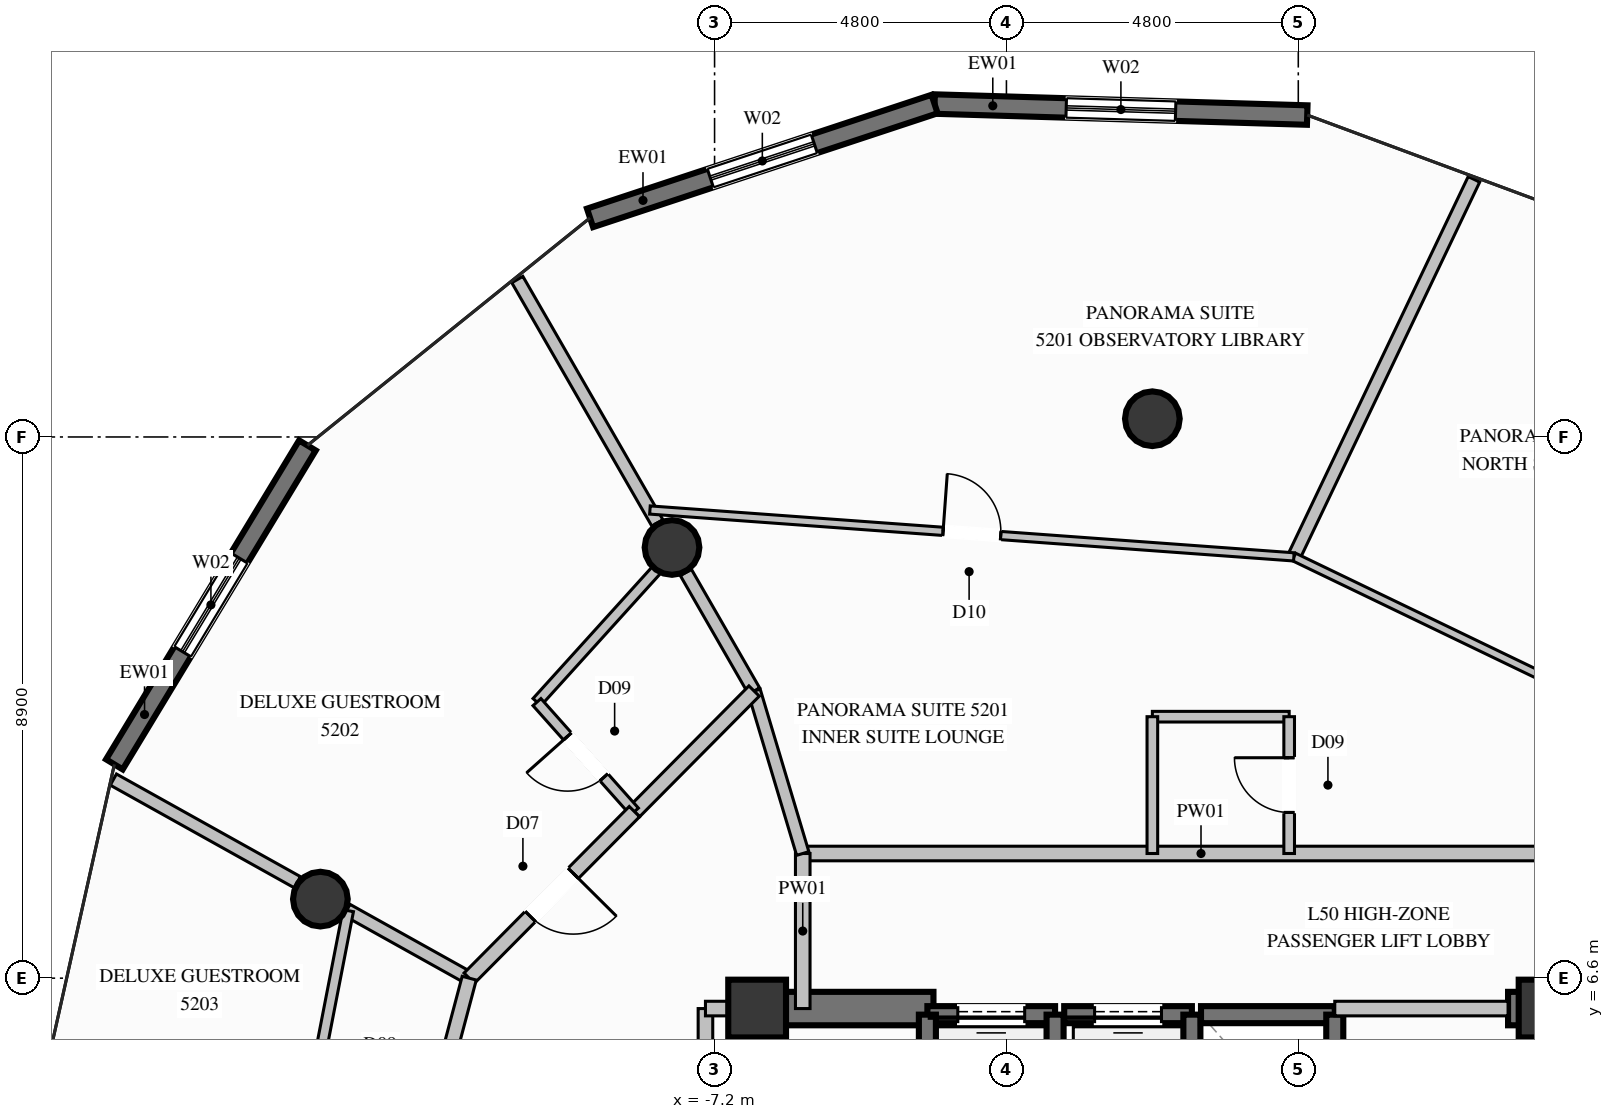
"""IFC4 building model, lengths in metres.
Left out: names, types, materials, properties, quantities, classifications, styles, units other than length and angle.
Written with IfcOpenShell. Run it as: python <this file> out.ifc"""

import sys

from ifc_helpers import new_model, si_unit, direction, frame, frame_2d, origin, origin_2d, place, context, subcontext, project, spatial, rectangle, circle, extrude, element, fill, save


model = new_model("IFC4")
c1 = context("Model", 3, precision=1e-05, world=origin(), true_north=direction((0.0, 1.0)))
c2 = subcontext(c1, "Body", "Model", "MODEL_VIEW")
j1 = project(units=[si_unit("LENGTHUNIT", "METRE"), si_unit("PLANEANGLEUNIT", "RADIAN")], contexts=[c1])
p1 = place(None, origin())
s1 = spatial("IfcSite", under=j1, at=p1, CompositionType="ELEMENT")
p2 = place(p1, origin())
s2 = spatial("IfcBuilding", under=s1, at=p2, CompositionType="ELEMENT")
p3 = place(p2, frame((0.0, 0.0, 194.8)))
s3 = spatial("IfcBuildingStorey", under=s2, at=p3, CompositionType="ELEMENT", Elevation=194.8)
for number, where, z_axis, x_axis in (
    (1, (6.5, 6.1, 0.0), (0.0, 0.0, 1.0), (1.0, 0.0, 0.0)),
    (2, (-6.5, 6.1, 0.0), (0.0, 0.0, 1.0), (1.0, 0.0, 0.0)),
):
    element("IfcColumn", number, at=place(p3, frame(where, z_axis=z_axis, x_axis=x_axis)), inside=s3, PredefinedType="COLUMN", context=c2, shape_type="SweptSolid", body=[
        extrude(rectangle(XDim=0.95, YDim=0.95, at=origin_2d()), origin(), (0.0, 0.0, 1.0), 3.6),
    ])
p4 = place(p3, frame((-6.225, 6.1, 0.0), z_axis=(0.0, 0.0, 1.0), x_axis=(1.0, 0.0, 0.0)))
e3 = element("IfcWall", 3, at=p4, inside=s3, PredefinedType="SHEAR", context=c2, shape_type="SweptSolid", body=[
    extrude(rectangle(XDim=2.625, YDim=0.55, at=frame_2d((1.312, 0.0))), origin(), (0.0, 0.0, 1.0), 3.6),
])
p5 = place(p3, frame((5.85, 6.1, 0.0), z_axis=(0.0, 0.0, 1.0), x_axis=(1.0, 0.0, 0.0)))
e4 = element("IfcWall", 4, at=p5, inside=s3, PredefinedType="SHEAR", context=c2, shape_type="SweptSolid", body=[
    extrude(rectangle(XDim=0.375, YDim=0.55, at=frame_2d((0.188, 0.0))), origin(), (0.0, 0.0, 1.0), 3.6),
])
p6 = place(p3, frame((-6.5, 2.35, 0.0), z_axis=(0.0, 0.0, 1.0), x_axis=(0.0, 1.0, 0.0)))
e5 = element("IfcWall", 5, at=p6, inside=s3, PredefinedType="SHEAR", context=c2, shape_type="SweptSolid", body=[
    extrude(rectangle(XDim=4.025, YDim=0.55, at=frame_2d((2.012, 0.0))), origin(), (0.0, 0.0, 1.0), 3.6),
])
p7 = place(p3, frame((6.5, 3.35, 0.0), z_axis=(0.0, 0.0, 1.0), x_axis=(0.0, 1.0, 0.0)))
e6 = element("IfcWall", 6, at=p7, inside=s3, PredefinedType="SHEAR", context=c2, shape_type="SweptSolid", body=[
    extrude(rectangle(XDim=3.025, YDim=0.55, at=frame_2d((1.512, 0.0))), origin(), (0.0, 0.0, 1.0), 3.6),
])
for number, where, z_axis, x_axis in (
    (7, (0.0, 15.8, 0.0), (0.0, 0.0, 1.0), (1.0, 0.0, 0.0)),
    (8, (-7.9, 13.683, 0.0), (0.0, 0.0, 1.0), (1.0, 0.0, 0.0)),
    (9, (-13.683, 7.9, 0.0), (0.0, 0.0, 1.0), (1.0, 0.0, 0.0)),
):
    element("IfcColumn", number, at=place(p3, frame(where, z_axis=z_axis, x_axis=x_axis)), inside=s3, PredefinedType="COLUMN", context=c2, shape_type="SweptSolid", body=[
        extrude(circle(Radius=0.45, at=origin_2d()), origin(), (0.0, 0.0, 1.0), 3.6),
    ])
p8 = place(p3, frame((-3.582, 20.975, 0.0), z_axis=(0.0, 0.0, 1.0), x_axis=(0.999563511361, -0.029542964566, 0.0)))
e10 = element("IfcWall", 10, at=p8, inside=s3, PredefinedType="SOLIDWALL", context=c2, shape_type="SweptSolid", body=[
    extrude(rectangle(XDim=6.132, YDim=0.32, at=frame_2d((3.066, 0.0))), origin(), (0.0, 0.0, 1.0), 3.36),
])
p9 = place(p8, frame((2.166, 0.0, 0.35)))
e11 = element("IfcOpeningElement", 11, at=p9, cuts=e10, PredefinedType="OPENING", context=c2, shape_type="SweptSolid", body=[
    extrude(rectangle(XDim=1.8, YDim=2.6, at=frame_2d((0.9, 1.3))), frame((0.0, 0.17, 0.0), z_axis=(0.0, -1.0, 0.0), x_axis=(1.0, 0.0, 0.0)), (0.0, 0.0, 1.0), 0.34),
])
p10 = place(p3, frame((-9.248, 19.103, 0.0), z_axis=(0.0, 0.0, 1.0), x_axis=(0.949514623973, 0.313722773898, 0.0)))
e12 = element("IfcWall", 12, at=p10, inside=s3, PredefinedType="SOLIDWALL", context=c2, shape_type="SweptSolid", body=[
    extrude(rectangle(XDim=5.967, YDim=0.32, at=frame_2d((2.984, 0.0))), origin(), (0.0, 0.0, 1.0), 3.36),
])
p11 = place(p10, frame((2.084, 0.0, 0.35)))
e13 = element("IfcOpeningElement", 13, at=p11, cuts=e12, PredefinedType="OPENING", context=c2, shape_type="SweptSolid", body=[
    extrude(rectangle(XDim=1.8, YDim=2.6, at=frame_2d((0.9, 1.3))), frame((0.0, 0.17, 0.0), z_axis=(0.0, -1.0, 0.0), x_axis=(1.0, 0.0, 0.0)), (0.0, 0.0, 1.0), 0.34),
])
p12 = place(p3, frame((-17.071, 10.116, 0.0), z_axis=(0.0, 0.0, 1.0), x_axis=(0.517847159829, 0.855473155077, 0.0)))
e14 = element("IfcWall", 14, at=p12, inside=s3, PredefinedType="SOLIDWALL", context=c2, shape_type="SweptSolid", body=[
    extrude(rectangle(XDim=6.131, YDim=0.32, at=frame_2d((3.066, 0.0))), origin(), (0.0, 0.0, 1.0), 3.36),
])
p13 = place(p12, frame((2.166, 0.0, 0.35)))
e15 = element("IfcOpeningElement", 15, at=p13, cuts=e14, PredefinedType="OPENING", context=c2, shape_type="SweptSolid", body=[
    extrude(rectangle(XDim=1.8, YDim=2.6, at=frame_2d((0.9, 1.3))), frame((0.0, 0.17, 0.0), z_axis=(0.0, -1.0, 0.0), x_axis=(1.0, 0.0, 0.0)), (0.0, 0.0, 1.0), 0.34),
])
p14 = place(p3, frame((-1.6, 6.0, 0.0), z_axis=(0.0, 0.0, 1.0), x_axis=(-1.0, 0.0, 0.0)))
e16 = element("IfcWall", 16, at=p14, inside=s3, PredefinedType="SOLIDWALL", context=c2, shape_type="SweptSolid", body=[
    extrude(rectangle(XDim=2.1, YDim=0.28, at=frame_2d((1.05, 0.0))), origin(), (0.0, 0.0, 1.0), 3.36),
])
p15 = place(p14, frame((0.5, 0.0, 0.0)))
e17 = element("IfcOpeningElement", 17, at=p15, cuts=e16, PredefinedType="OPENING", context=c2, shape_type="SweptSolid", body=[
    extrude(rectangle(XDim=1.1, YDim=2.2, at=frame_2d((0.55, 1.1))), frame((0.0, 0.15, 0.0), z_axis=(0.0, -1.0, 0.0), x_axis=(1.0, 0.0, 0.0)), (0.0, 0.0, 1.0), 0.3),
])
for number, where, z_axis, x_axis in (
    (18, (-3.7, 6.0, 0.0), (0.0, 0.0, 1.0), (0.0, -1.0, 0.0)),
    (19, (-1.6, 3.5, 0.0), (0.0, 0.0, 1.0), (0.0, 1.0, 0.0)),
):
    element("IfcWall", number, at=place(p3, frame(where, z_axis=z_axis, x_axis=x_axis)), inside=s3, PredefinedType="SOLIDWALL", context=c2, shape_type="SweptSolid", body=[
        extrude(rectangle(XDim=2.5, YDim=0.28, at=frame_2d((1.25, 0.0))), origin(), (0.0, 0.0, 1.0), 3.36),
    ])
p16 = place(p3, frame((0.65, 6.0, 0.0), z_axis=(0.0, 0.0, 1.0), x_axis=(-1.0, 0.0, 0.0)))
e20 = element("IfcWall", 20, at=p16, inside=s3, PredefinedType="SOLIDWALL", context=c2, shape_type="SweptSolid", body=[
    extrude(rectangle(XDim=2.1, YDim=0.28, at=frame_2d((1.05, 0.0))), origin(), (0.0, 0.0, 1.0), 3.36),
])
p17 = place(p16, frame((0.5, 0.0, 0.0)))
e21 = element("IfcOpeningElement", 21, at=p17, cuts=e20, PredefinedType="OPENING", context=c2, shape_type="SweptSolid", body=[
    extrude(rectangle(XDim=1.1, YDim=2.2, at=frame_2d((0.55, 1.1))), frame((0.0, 0.15, 0.0), z_axis=(0.0, -1.0, 0.0), x_axis=(1.0, 0.0, 0.0)), (0.0, 0.0, 1.0), 0.3),
])
p18 = place(p3, frame((0.65, 3.5, 0.0), z_axis=(0.0, 0.0, 1.0), x_axis=(0.0, 1.0, 0.0)))
e22 = element("IfcWall", 22, at=p18, inside=s3, PredefinedType="SOLIDWALL", context=c2, shape_type="SweptSolid", body=[
    extrude(rectangle(XDim=2.5, YDim=0.28, at=frame_2d((1.25, 0.0))), origin(), (0.0, 0.0, 1.0), 3.36),
])
p19 = place(p3, frame((3.0, 6.0, 0.0), z_axis=(0.0, 0.0, 1.0), x_axis=(-1.0, 0.0, 0.0)))
e23 = element("IfcWall", 23, at=p19, inside=s3, PredefinedType="SOLIDWALL", context=c2, shape_type="SweptSolid", body=[
    extrude(rectangle(XDim=2.2, YDim=0.28, at=frame_2d((1.1, 0.0))), origin(), (0.0, 0.0, 1.0), 3.36),
])
p20 = place(p3, frame((3.0, 3.5, 0.0), z_axis=(0.0, 0.0, 1.0), x_axis=(0.0, 1.0, 0.0)))
e24 = element("IfcWall", 24, at=p20, inside=s3, PredefinedType="SOLIDWALL", context=c2, shape_type="SweptSolid", body=[
    extrude(rectangle(XDim=2.5, YDim=0.28, at=frame_2d((1.25, 0.0))), origin(), (0.0, 0.0, 1.0), 3.36),
])
p21 = place(p3, frame((-5.75, 8.65, 0.0), z_axis=(0.0, 0.0, 1.0), x_axis=(1.0, 0.0, 0.0)))
e25 = element("IfcWall", 25, at=p21, inside=s3, PredefinedType="PARTITIONING", context=c2, shape_type="SweptSolid", body=[
    extrude(rectangle(XDim=13.1, YDim=0.24, at=frame_2d((6.55, 0.0))), origin(), (0.0, 0.0, 1.0), 3.36),
])
p22 = place(p3, frame((3.0, 6.1, 0.0), z_axis=(0.0, 0.0, 1.0), x_axis=(1.0, 0.0, 0.0)))
e26 = element("IfcWall", 26, at=p22, inside=s3, PredefinedType="PARTITIONING", context=c2, shape_type="SweptSolid", body=[
    extrude(rectangle(XDim=2.85, YDim=0.24, at=frame_2d((1.425, 0.0))), origin(), (0.0, 0.0, 1.0), 2.445),
])
p23 = place(p3, frame((-5.75, 6.1, 0.0), z_axis=(0.0, 0.0, 1.0), x_axis=(0.0, 1.0, 0.0)))
e27 = element("IfcWall", 27, at=p23, inside=s3, PredefinedType="PARTITIONING", context=c2, shape_type="SweptSolid", body=[
    extrude(rectangle(XDim=2.55, YDim=0.24, at=frame_2d((1.275, 0.0))), origin(), (0.0, 0.0, 1.0), 3.36),
])
p24 = place(p3, frame((-7.35, 4.95, 0.0), z_axis=(0.0, 0.0, 1.0), x_axis=(0.0, 1.0, 0.0)))
e28 = element("IfcWall", 28, at=p24, inside=s3, PredefinedType="PARTITIONING", context=c2, shape_type="SweptSolid", body=[
    extrude(rectangle(XDim=1.15, YDim=0.24, at=frame_2d((0.575, 0.0))), origin(), (0.0, 0.0, 1.0), 2.445),
])
p25 = place(p3, frame((-7.35, 6.1, 0.0), z_axis=(0.0, 0.0, 1.0), x_axis=(1.0, 0.0, 0.0)))
e29 = element("IfcWall", 29, at=p25, inside=s3, PredefinedType="PARTITIONING", context=c2, shape_type="SweptSolid", body=[
    extrude(rectangle(XDim=0.85, YDim=0.24, at=frame_2d((0.425, 0.0))), origin(), (0.0, 0.0, 1.0), 2.801),
])
p26 = place(p3, frame((-6.55, 11.322, 0.0), z_axis=(0.0, 0.0, 1.0), x_axis=(-0.498754501597, 0.866743299447, 0.0)))
e30 = element("IfcWall", 30, at=p26, inside=s3, PredefinedType="PARTITIONING", context=c2, shape_type="SweptSolid", body=[
    extrude(rectangle(XDim=2.25, YDim=0.21, at=frame_2d((1.125, 0.0))), origin(), (0.0, 0.0, 1.0), 2.801),
])
p27 = place(p3, frame((-8.141, 14.087, 0.0), z_axis=(0.0, 0.0, 1.0), x_axis=(-0.498750239611, 0.866745751929, 0.0)))
e31 = element("IfcWall", 31, at=p27, inside=s3, PredefinedType="PARTITIONING", context=c2, shape_type="SweptSolid", body=[
    extrude(rectangle(XDim=4.617, YDim=0.21, at=frame_2d((2.309, 0.0))), origin(), (0.0, 0.0, 1.0), 3.36),
])
p28 = place(p3, frame((-11.235, 6.6, 0.0), z_axis=(0.0, 0.0, 1.0), x_axis=(-0.873326612339, 0.487135123123, 0.0)))
e32 = element("IfcWall", 32, at=p28, inside=s3, PredefinedType="PARTITIONING", context=c2, shape_type="SweptSolid", body=[
    extrude(rectangle(XDim=2.305, YDim=0.21, at=frame_2d((1.152, 0.0))), origin(), (0.0, 0.0, 1.0), 2.801),
])
p29 = place(p3, frame((-14.062, 8.178, 0.0), z_axis=(0.0, 0.0, 1.0), x_axis=(-0.873305073503, 0.487173735533, 0.0)))
e33 = element("IfcWall", 33, at=p29, inside=s3, PredefinedType="PARTITIONING", context=c2, shape_type="SweptSolid", body=[
    extrude(rectangle(XDim=3.465, YDim=0.21, at=frame_2d((1.732, 0.0))), origin(), (0.0, 0.0, 1.0), 3.36),
])
for number, where, z_axis, x_axis in (
    (34, (0.0, 10.9, 0.0), (0.0, 0.0, 1.0), (1.0, 0.0, 0.0)),
    (35, (0.0, 10.9, 0.0), (0.0, 0.0, 1.0), (0.0, -1.0, 0.0)),
):
    element("IfcWall", number, at=place(p3, frame(where, z_axis=z_axis, x_axis=x_axis)), inside=s3, PredefinedType="PLUMBINGWALL", context=c2, shape_type="SweptSolid", body=[
        extrude(rectangle(XDim=2.25, YDim=0.175, at=frame_2d((1.125, 0.0))), origin(), (0.0, 0.0, 1.0), 3.36),
    ])
p30 = place(p3, frame((2.25, 8.65, 0.0), z_axis=(0.0, 0.0, 1.0), x_axis=(0.0, 1.0, 0.0)))
e36 = element("IfcWall", 36, at=p30, inside=s3, PredefinedType="PLUMBINGWALL", context=c2, shape_type="SweptSolid", body=[
    extrude(rectangle(XDim=2.25, YDim=0.175, at=frame_2d((1.125, 0.0))), origin(), (0.0, 0.0, 1.0), 3.36),
])
p31 = place(p30, frame((0.675, 0.0, 0.0)))
e37 = element("IfcOpeningElement", 37, at=p31, cuts=e36, PredefinedType="OPENING", context=c2, shape_type="SweptSolid", body=[
    extrude(rectangle(XDim=0.9, YDim=2.1, at=frame_2d((0.45, 1.05))), frame((0.0, 0.098, 0.0), z_axis=(0.0, -1.0, 0.0), x_axis=(1.0, 0.0, 0.0)), (0.0, 0.0, 1.0), 0.195),
])
p32 = place(p3, frame((-6.55, 11.322, 0.0), z_axis=(0.0, 0.0, 1.0), x_axis=(0.286825893059, -0.957982727961, 0.0)))
e38 = element("IfcWall", 38, at=p32, inside=s3, PredefinedType="PARTITIONING", context=c2, shape_type="SweptSolid", body=[
    extrude(rectangle(XDim=2.789, YDim=0.21, at=frame_2d((1.395, 0.0))), origin(), (0.0, 0.0, 1.0), 3.36),
])
p33 = place(p3, frame((2.327, 13.528, 0.0), z_axis=(0.0, 0.0, 1.0), x_axis=(0.430585057704, 0.902550003093, 0.0)))
e39 = element("IfcWall", 39, at=p33, inside=s3, PredefinedType="PARTITIONING", context=c2, shape_type="SweptSolid", body=[
    extrude(rectangle(XDim=6.879, YDim=0.21, at=frame_2d((3.44, 0.0))), origin(), (0.0, 0.0, 1.0), 3.36),
])
p34 = place(p3, frame((2.327, 13.528, 0.0), z_axis=(0.0, 0.0, 1.0), x_axis=(0.900917232422, -0.433990944981, 0.0)))
e40 = element("IfcWall", 40, at=p34, inside=s3, PredefinedType="PARTITIONING", context=c2, shape_type="SweptSolid", body=[
    extrude(rectangle(XDim=12.602, YDim=0.135, at=frame_2d((6.301, 0.0))), origin(), (0.0, 0.0, 1.0), 2.929),
])
p35 = place(p34, frame((5.826, 0.0, 0.0)))
e41 = element("IfcOpeningElement", 41, at=p35, cuts=e40, PredefinedType="OPENING", context=c2, shape_type="SweptSolid", body=[
    extrude(rectangle(XDim=0.95, YDim=2.1, at=frame_2d((0.475, 1.05))), frame((0.0, 0.078, 0.0), z_axis=(0.0, -1.0, 0.0), x_axis=(1.0, 0.0, 0.0)), (0.0, 0.0, 1.0), 0.155),
])
p36 = place(p3, frame((-8.263, 14.299, 0.0), z_axis=(0.0, 0.0, 1.0), x_axis=(0.997360188486, -0.072613045814, 0.0)))
e42 = element("IfcWall", 42, at=p36, inside=s3, PredefinedType="PARTITIONING", context=c2, shape_type="SweptSolid", body=[
    extrude(rectangle(XDim=10.618, YDim=0.135, at=frame_2d((5.309, 0.0))), origin(), (0.0, 0.0, 1.0), 2.929),
])
p37 = place(p36, frame((4.834, 0.0, 0.0)))
e43 = element("IfcOpeningElement", 43, at=p37, cuts=e42, PredefinedType="OPENING", context=c2, shape_type="SweptSolid", body=[
    extrude(rectangle(XDim=0.95, YDim=2.1, at=frame_2d((0.475, 1.05))), frame((0.0, 0.078, 0.0), z_axis=(0.0, -1.0, 0.0), x_axis=(1.0, 0.0, 0.0)), (0.0, 0.0, 1.0), 0.155),
])
p38 = place(p3, frame((-6.55, 11.322, 0.0), z_axis=(0.0, 0.0, 1.0), x_axis=(-0.704436417235, -0.709767098472, 0.0)))
e44 = element("IfcWall", 44, at=p38, inside=s3, PredefinedType="PARTITIONING", context=c2, shape_type="SweptSolid", body=[
    extrude(rectangle(XDim=2.794, YDim=0.24, at=frame_2d((1.397, 0.0))), origin(), (0.0, 0.0, 1.0), 3.36),
])
p39 = place(p3, frame((-7.874, 13.623, 0.0), z_axis=(0.0, 0.0, 1.0), x_axis=(-0.670980131946, -0.741475328338, 0.0)))
e45 = element("IfcWall", 45, at=p39, inside=s3, PredefinedType="PLUMBINGWALL", context=c2, shape_type="SweptSolid", body=[
    extrude(rectangle(XDim=3.349, YDim=0.175, at=frame_2d((1.674, 0.0))), origin(), (0.0, 0.0, 1.0), 2.929),
])
p40 = place(p3, frame((-8.518, 9.339, 0.0), z_axis=(0.0, 0.0, 1.0), x_axis=(-0.66490420922, 0.746928639538, 0.0)))
e46 = element("IfcWall", 46, at=p40, inside=s3, PredefinedType="PLUMBINGWALL", context=c2, shape_type="SweptSolid", body=[
    extrude(rectangle(XDim=2.411, YDim=0.175, at=frame_2d((1.206, 0.0))), origin(), (0.0, 0.0, 1.0), 3.36),
])
p41 = place(p40, frame((0.756, 0.0, 0.0)))
e47 = element("IfcOpeningElement", 47, at=p41, cuts=e46, PredefinedType="OPENING", context=c2, shape_type="SweptSolid", body=[
    extrude(rectangle(XDim=0.9, YDim=2.1, at=frame_2d((0.45, 1.05))), frame((0.0, 0.098, 0.0), z_axis=(0.0, -1.0, 0.0), x_axis=(1.0, 0.0, 0.0)), (0.0, 0.0, 1.0), 0.195),
])
p42 = place(p3, frame((-8.518, 9.339, 0.0), z_axis=(0.0, 0.0, 1.0), x_axis=(-0.7042534056, -0.70994868878, 0.0)))
e48 = element("IfcWall", 48, at=p42, inside=s3, PredefinedType="PARTITIONING", context=c2, shape_type="SweptSolid", body=[
    extrude(rectangle(XDim=3.858, YDim=0.24, at=frame_2d((1.929, 0.0))), origin(), (0.0, 0.0, 1.0), 3.36),
])
p43 = place(p42, frame((1.429, 0.0, 0.0)))
e49 = element("IfcOpeningElement", 49, at=p43, cuts=e48, PredefinedType="OPENING", context=c2, shape_type="SweptSolid", body=[
    extrude(rectangle(XDim=1.0, YDim=2.2, at=frame_2d((0.5, 1.1))), frame((0.0, 0.13, 0.0), z_axis=(0.0, -1.0, 0.0), x_axis=(1.0, 0.0, 0.0)), (0.0, 0.0, 1.0), 0.26),
])
p44 = place(p3, frame((-11.235, 6.6, 0.0), z_axis=(0.0, 0.0, 1.0), x_axis=(-0.25685481711, -0.966450000221, 0.0)))
e50 = element("IfcWall", 50, at=p44, inside=s3, PredefinedType="PARTITIONING", context=c2, shape_type="SweptSolid", body=[
    extrude(rectangle(XDim=2.803, YDim=0.24, at=frame_2d((1.401, 0.0))), origin(), (0.0, 0.0, 1.0), 3.36),
])
p45 = place(p3, frame((-13.225, 7.71, 0.0), z_axis=(0.0, 0.0, 1.0), x_axis=(-0.190691026057, -0.981650107004, 0.0)))
e51 = element("IfcWall", 51, at=p45, inside=s3, PredefinedType="PLUMBINGWALL", context=c2, shape_type="SweptSolid", body=[
    extrude(rectangle(XDim=3.256, YDim=0.175, at=frame_2d((1.628, 0.0))), origin(), (0.0, 0.0, 1.0), 2.929),
])
p46 = place(p9, origin())
e52 = element("IfcWindow", 52, at=p46, inside=s3, PartitioningType="SINGLE_PANEL", PredefinedType="WINDOW", context=c2, shape_type="SweptSolid", body=[
    extrude(rectangle(XDim=1.8, YDim=2.6, at=frame_2d((0.9, 1.3))), frame((0.0, 0.03, 0.0), z_axis=(0.0, -1.0, 0.0), x_axis=(1.0, 0.0, 0.0)), (0.0, 0.0, 1.0), 0.06),
])
fill(e11, e52)
p47 = place(p11, origin())
e53 = element("IfcWindow", 53, at=p47, inside=s3, PartitioningType="SINGLE_PANEL", PredefinedType="WINDOW", context=c2, shape_type="SweptSolid", body=[
    extrude(rectangle(XDim=1.8, YDim=2.6, at=frame_2d((0.9, 1.3))), frame((0.0, 0.03, 0.0), z_axis=(0.0, -1.0, 0.0), x_axis=(1.0, 0.0, 0.0)), (0.0, 0.0, 1.0), 0.06),
])
fill(e13, e53)
p48 = place(p13, origin())
e54 = element("IfcWindow", 54, at=p48, inside=s3, PartitioningType="SINGLE_PANEL", PredefinedType="WINDOW", context=c2, shape_type="SweptSolid", body=[
    extrude(rectangle(XDim=1.8, YDim=2.6, at=frame_2d((0.9, 1.3))), frame((0.0, 0.03, 0.0), z_axis=(0.0, -1.0, 0.0), x_axis=(1.0, 0.0, 0.0)), (0.0, 0.0, 1.0), 0.06),
])
fill(e15, e54)
p49 = place(p15, origin())
e55 = element("IfcDoor", 55, at=p49, inside=s3, OperationType="SLIDING_TO_LEFT", PredefinedType="DOOR", context=c2, shape_type="SweptSolid", body=[
    extrude(rectangle(XDim=1.1, YDim=2.2, at=frame_2d((0.55, 1.1))), frame((0.0, 0.025, 0.0), z_axis=(0.0, -1.0, 0.0), x_axis=(1.0, 0.0, 0.0)), (0.0, 0.0, 1.0), 0.05),
])
fill(e17, e55)
p50 = place(p17, origin())
e56 = element("IfcDoor", 56, at=p50, inside=s3, OperationType="SLIDING_TO_LEFT", PredefinedType="DOOR", context=c2, shape_type="SweptSolid", body=[
    extrude(rectangle(XDim=1.1, YDim=2.2, at=frame_2d((0.55, 1.1))), frame((0.0, 0.025, 0.0), z_axis=(0.0, -1.0, 0.0), x_axis=(1.0, 0.0, 0.0)), (0.0, 0.0, 1.0), 0.05),
])
fill(e21, e56)
p51 = place(p31, origin())
e57 = element("IfcDoor", 57, at=p51, inside=s3, OperationType="SINGLE_SWING_RIGHT", PredefinedType="DOOR", context=c2, shape_type="SweptSolid", body=[
    extrude(rectangle(XDim=0.9, YDim=2.1, at=frame_2d((0.45, 1.05))), frame((0.0, 0.025, 0.0), z_axis=(0.0, -1.0, 0.0), x_axis=(1.0, 0.0, 0.0)), (0.0, 0.0, 1.0), 0.05),
])
fill(e37, e57)
p52 = place(p37, origin())
e58 = element("IfcDoor", 58, at=p52, inside=s3, OperationType="SINGLE_SWING_LEFT", PredefinedType="DOOR", context=c2, shape_type="SweptSolid", body=[
    extrude(rectangle(XDim=0.95, YDim=2.1, at=frame_2d((0.475, 1.05))), frame((0.0, 0.025, 0.0), z_axis=(0.0, -1.0, 0.0), x_axis=(1.0, 0.0, 0.0)), (0.0, 0.0, 1.0), 0.05),
])
fill(e43, e58)
p53 = place(p41, origin())
e59 = element("IfcDoor", 59, at=p53, inside=s3, OperationType="SINGLE_SWING_RIGHT", PredefinedType="DOOR", context=c2, shape_type="SweptSolid", body=[
    extrude(rectangle(XDim=0.9, YDim=2.1, at=frame_2d((0.45, 1.05))), frame((0.0, 0.025, 0.0), z_axis=(0.0, -1.0, 0.0), x_axis=(1.0, 0.0, 0.0)), (0.0, 0.0, 1.0), 0.05),
])
fill(e47, e59)
p54 = place(p43, origin())
e60 = element("IfcDoor", 60, at=p54, inside=s3, OperationType="SINGLE_SWING_LEFT", PredefinedType="DOOR", context=c2, shape_type="SweptSolid", body=[
    extrude(rectangle(XDim=1.0, YDim=2.2, at=frame_2d((0.5, 1.1))), frame((0.0, 0.025, 0.0), z_axis=(0.0, -1.0, 0.0), x_axis=(1.0, 0.0, 0.0)), (0.0, 0.0, 1.0), 0.05),
])
fill(e49, e60)
save(model, sys.argv[1])
